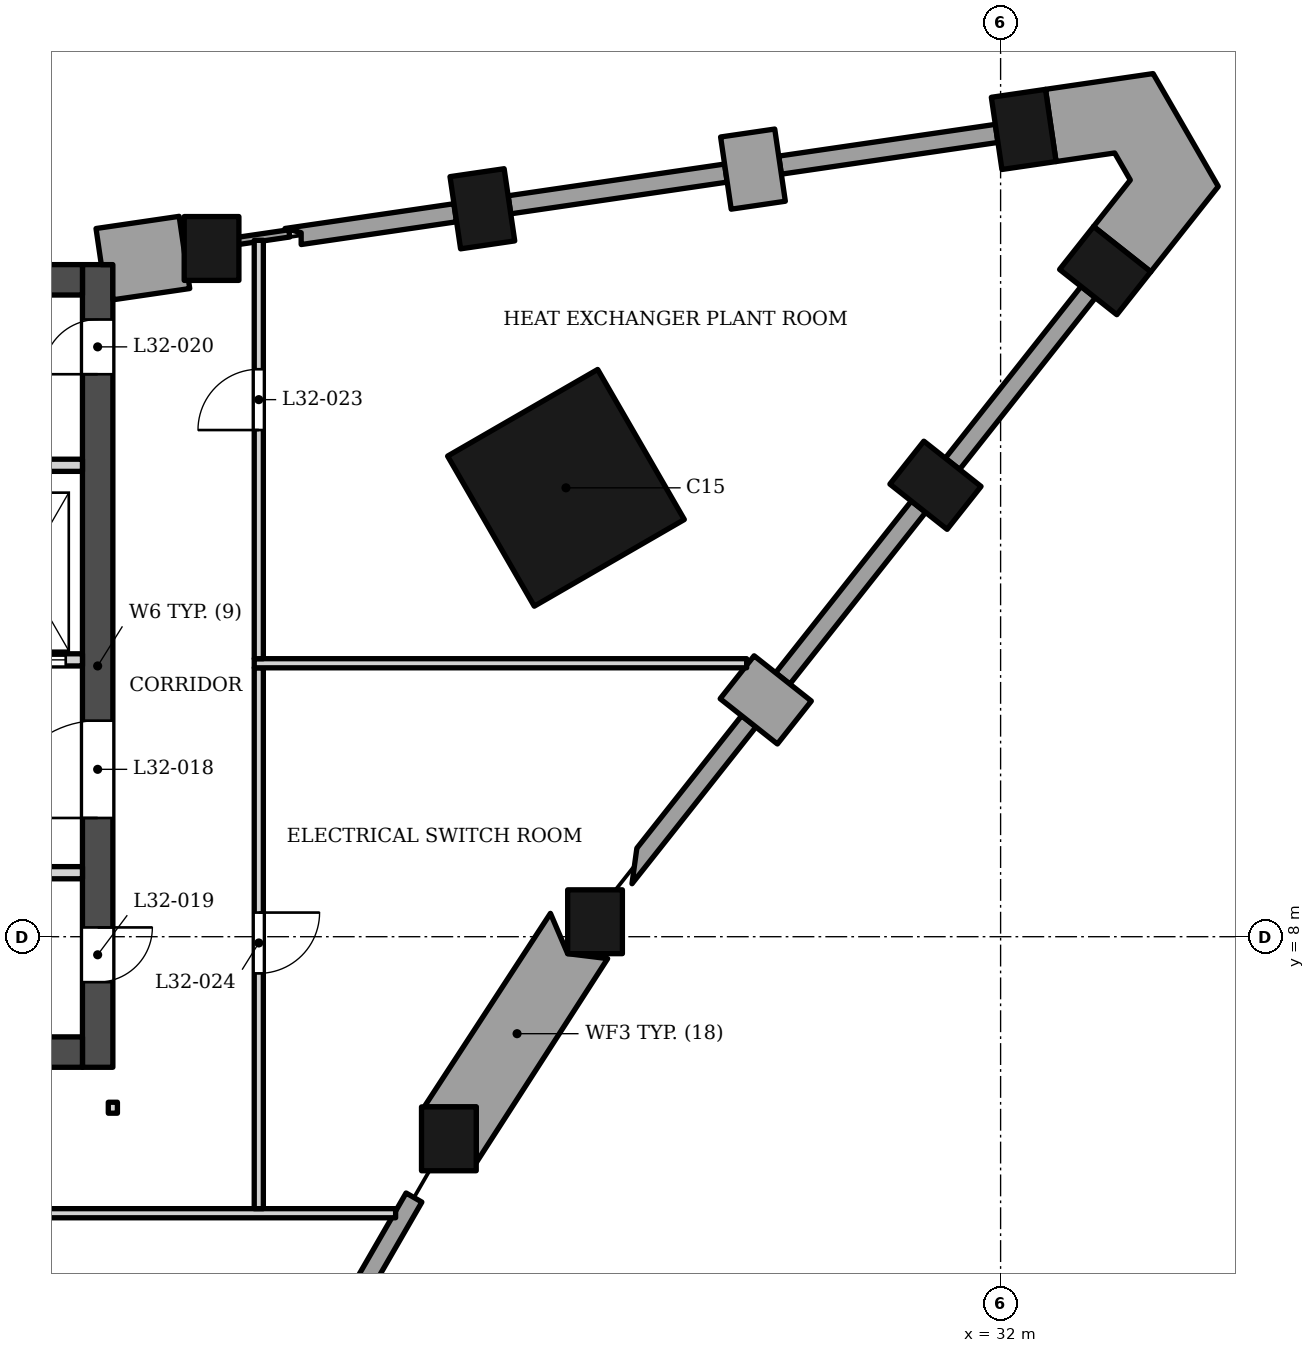
"""IFC4 building model, lengths in metres.
Left out: names, types, materials, properties, quantities, classifications, styles, units other than length and angle.
Written with IfcOpenShell. Run it as: python <this file> out.ifc"""

import sys

from ifc_helpers import new_model, si_unit, direction, frame, frame_2d, origin, origin_2d, place, context, subcontext, project, spatial, polyline, rectangle, outline, extrude, clip, halfspace, element, fill, save


model = new_model("IFC4")
c1 = context("Model", 3, precision=1e-05, world=origin(), true_north=direction((0.0, 1.0)))
c2 = subcontext(c1, "Body", "Model", "MODEL_VIEW")
j1 = project(units=[si_unit("LENGTHUNIT", "METRE"), si_unit("PLANEANGLEUNIT", "RADIAN")], contexts=[c1])
p1 = place(None, origin())
s1 = spatial("IfcSite", under=j1, at=p1, CompositionType="ELEMENT")
p2 = place(p1, origin())
s2 = spatial("IfcBuilding", under=s1, at=p2, CompositionType="ELEMENT")
p3 = place(p2, frame((0.0, 0.0, 139.6)))
s3 = spatial("IfcBuildingStorey", under=s2, at=p3, CompositionType="ELEMENT", Elevation=139.6)
p4 = place(p3, frame((-16.9, 18.802, 0.0), z_axis=(0.0, 0.0, 1.0), x_axis=(1.0, 0.0, 0.0)))
e1 = element("IfcWall", 1, at=p4, inside=s3, PredefinedType="SHEAR", context=c2, shape_type="SweptSolid", body=[
    extrude(rectangle(XDim=33.8, YDim=0.5, at=frame_2d((16.9, 0.0))), origin(), (0.0, 0.0, 1.0), 5.0),
])
p5 = place(p3, frame((12.6, 6.103, 0.0), z_axis=(0.0, 0.0, 1.0), x_axis=(1.0, 0.0, 0.0)))
e2 = element("IfcWall", 2, at=p5, inside=s3, PredefinedType="SHEAR", context=c2, shape_type="SweptSolid", body=[
    extrude(rectangle(XDim=4.3, YDim=0.5, at=frame_2d((2.15, 0.0))), origin(), (0.0, 0.0, 1.0), 5.0),
])
p6 = place(p3, frame((17.15, 5.853, 0.0), z_axis=(0.0, 0.0, 1.0), x_axis=(0.0, 1.0, 0.0)))
e3 = element("IfcWall", 3, at=p6, inside=s3, PredefinedType="SHEAR", context=c2, shape_type="SweptSolid", body=[
    extrude(rectangle(XDim=13.2, YDim=0.5, at=frame_2d((6.6, 0.0))), origin(), (0.0, 0.0, 1.0), 5.0),
])
p7 = place(p6, frame((4.1, 0.0, 0.0)))
e4 = element("IfcOpeningElement", 4, at=p7, cuts=e3, PredefinedType="OPENING", context=c2, shape_type="SweptSolid", body=[
    extrude(rectangle(XDim=1.6, YDim=2.1, at=frame_2d((0.8, 1.05))), frame((0.0, 0.26, 0.0), z_axis=(0.0, -1.0, 0.0), x_axis=(1.0, 0.0, 0.0)), (0.0, 0.0, 1.0), 0.52),
])
p8 = place(p6, frame((1.4, 0.0, 0.0)))
e5 = element("IfcOpeningElement", 5, at=p8, cuts=e3, PredefinedType="OPENING", context=c2, shape_type="SweptSolid", body=[
    extrude(rectangle(XDim=0.9, YDim=2.1, at=frame_2d((0.45, 1.05))), frame((0.0, 0.26, 0.0), z_axis=(0.0, -1.0, 0.0), x_axis=(1.0, 0.0, 0.0)), (0.0, 0.0, 1.0), 0.52),
])
p9 = place(p6, frame((11.397, 0.0, 0.0)))
e6 = element("IfcOpeningElement", 6, at=p9, cuts=e3, PredefinedType="OPENING", context=c2, shape_type="SweptSolid", body=[
    extrude(rectangle(XDim=0.9, YDim=2.1, at=frame_2d((0.45, 1.05))), frame((0.0, 0.26, 0.0), z_axis=(0.0, -1.0, 0.0), x_axis=(1.0, 0.0, 0.0)), (0.0, 0.0, 1.0), 0.52),
])
for number, where, z_axis, x_axis in (
    (7, (30.929, 15.424, 0.0), (0.0, 0.0, 1.0), (0.62, 0.784, 0.0)),
    (8, (33.72, 18.954, 0.0), (0.0, 0.0, 1.0), (0.62, 0.784, 0.0)),
    (9, (32.38, 21.276, 0.0), (0.0, 0.0, 1.0), (-0.989, -0.145, 0.0)),
    (10, (23.477, 19.971, 0.0), (0.0, 0.0, 1.0), (-0.989, -0.145, 0.0)),
):
    element("IfcColumn", number, at=place(p3, frame(where, z_axis=z_axis, x_axis=x_axis)), inside=s3, PredefinedType="COLUMN", context=c2, shape_type="SweptSolid", body=[
        extrude(rectangle(XDim=0.9, YDim=1.2, at=origin_2d()), origin(), (0.0, 0.0, 1.0), 5.0),
    ])
p10 = place(p3, frame((24.852, 15.382, 0.0), z_axis=(0.0, 0.0, 1.0), x_axis=(-0.866025403784, -0.5, 0.0)))
e11 = element("IfcColumn", 11, at=p10, inside=s3, PredefinedType="COLUMN", context=c2, shape_type="SweptSolid", body=[
    extrude(rectangle(XDim=2.85, YDim=2.85, at=origin_2d()), origin(), (0.0, 0.0, 1.0), 5.0),
])
p11 = place(p3, frame((22.926, 4.676, 0.0), z_axis=(-0.300174860852, -0.087380939098, 0.949873478098), x_axis=(0.279498644508, -0.960146086655, 0.0)))
e12 = element("IfcColumn", 12, at=p11, inside=s3, PredefinedType="COLUMN", context=c2, shape_type="Clipping", body=[
    clip(clip(extrude(rectangle(XDim=0.9, YDim=1.05, at=origin_2d()), origin(), (0.0, 0.0, 1.0), 5.264), halfspace(frame((0.0, 0.0, 0.177), z_axis=(0.0, 0.0, 1.0), x_axis=(1.0, 0.0, 0.0)), True)), halfspace(frame((0.0, 0.0, 5.087), z_axis=(0.0, 0.0, 1.0), x_axis=(1.0, 0.0, 0.0)), False)),
])
p12 = place(p3, frame((25.33, 8.246, 0.0), z_axis=(0.082150199486, 0.599389316364, 0.796230991706), x_axis=(-0.990738041901, 0.135787084552, 0.0)))
e13 = element("IfcColumn", 13, at=p12, inside=s3, PredefinedType="COLUMN", context=c2, shape_type="Clipping", body=[
    clip(clip(extrude(rectangle(XDim=0.9, YDim=1.05, at=origin_2d()), origin(), (0.0, 0.0, 1.0), 6.28), halfspace(frame((0.0, 0.0, 0.404), z_axis=(0.0, 0.0, 1.0), x_axis=(1.0, 0.0, 0.0)), True)), halfspace(frame((0.0, 0.0, 5.875), z_axis=(0.0, 0.0, 1.0), x_axis=(1.0, 0.0, 0.0)), False)),
])
p13 = place(p3, frame((19.023, 19.318, 0.0), z_axis=(0.200397317099, -0.051878781018, 0.978340179784), x_axis=(0.250617765495, 0.968086119939, 0.0)))
e14 = element("IfcColumn", 14, at=p13, inside=s3, PredefinedType="COLUMN", context=c2, shape_type="Clipping", body=[
    clip(clip(extrude(rectangle(XDim=0.9, YDim=1.05, at=origin_2d()), origin(), (0.0, 0.0, 1.0), 5.111), halfspace(frame((0.0, 0.0, 0.117), z_axis=(0.0, 0.0, 1.0), x_axis=(1.0, 0.0, 0.0)), True)), halfspace(frame((0.0, 0.0, 4.994), z_axis=(0.0, 0.0, 1.0), x_axis=(1.0, 0.0, 0.0)), False)),
])
p14 = place(p3, frame((20.552, 0.593, 0.0), z_axis=(0.0, 0.0, 1.0), x_axis=(0.500012057535, 0.866018442252, 0.0)))
e15 = element("IfcWall", 15, at=p14, inside=s3, PredefinedType="ELEMENTEDWALL", context=c2, shape_type="SweptSolid", body=[
    extrude(rectangle(XDim=3.6, YDim=0.3, at=frame_2d((1.8, 0.0))), origin(), (0.0, 0.0, 1.0), 3.5),
])
p15 = place(p3, frame((28.608, 11.522, 0.0), z_axis=(0.0, 0.0, 1.0), x_axis=(-0.784408686564, 0.620244316736, 0.0)))
e16 = element("IfcWall", 16, at=p15, inside=s3, PredefinedType="SOLIDWALL", context=c2, shape_type="SweptSolid", body=[
    extrude(rectangle(XDim=1.2, YDim=0.9, at=frame_2d((0.6, 0.0))), origin(), (0.0, 0.0, 1.0), 3.5),
])
p16 = place(p3, origin())
e17 = element("IfcWall", 17, at=p16, inside=s3, PredefinedType="ELEMENTEDWALL", context=c2, shape_type="SweptSolid", body=[
    extrude(outline(polyline([(27.741, 11.635), (26.018, 9.456), (25.938, 8.871), (27.976, 11.449), (27.741, 11.635)])), origin(), (0.0, 0.0, 1.0), 3.5),
])
p17 = place(p3, frame((28.417, 12.248, 0.0), z_axis=(0.0, 0.0, 1.0), x_axis=(0.620310302622, 0.784356505972, 0.0)))
e18 = element("IfcWall", 18, at=p17, inside=s3, PredefinedType="ELEMENTEDWALL", context=c2, shape_type="SweptSolid", body=[
    extrude(rectangle(XDim=3.6, YDim=0.3, at=frame_2d((1.8, 0.0))), origin(), (0.0, 0.0, 1.0), 3.5),
])
p18 = place(p3, frame((31.208, 15.777, 0.0), z_axis=(0.0, 0.0, 1.0), x_axis=(0.620301575857, 0.784363407477, 0.0)))
e19 = element("IfcWall", 19, at=p18, inside=s3, PredefinedType="ELEMENTEDWALL", context=c2, shape_type="SweptSolid", body=[
    extrude(rectangle(XDim=3.6, YDim=0.3, at=frame_2d((1.8, 0.0))), origin(), (0.0, 0.0, 1.0), 3.5),
])
p19 = place(p3, frame((27.84, 21.217, 0.0), z_axis=(0.0, 0.0, 1.0), x_axis=(0.145066385332, -0.989421924078, 0.0)))
e20 = element("IfcWall", 20, at=p19, inside=s3, PredefinedType="SOLIDWALL", context=c2, shape_type="SweptSolid", body=[
    extrude(rectangle(XDim=1.2, YDim=0.9, at=frame_2d((0.6, 0.0))), origin(), (0.0, 0.0, 1.0), 3.5),
])
p20 = place(p3, frame((31.935, 21.211, 0.0), z_axis=(0.0, 0.0, 1.0), x_axis=(-0.98942335115, -0.145056651687, 0.0)))
e21 = element("IfcWall", 21, at=p20, inside=s3, PredefinedType="ELEMENTEDWALL", context=c2, shape_type="SweptSolid", body=[
    extrude(rectangle(XDim=3.6, YDim=0.3, at=frame_2d((1.8, 0.0))), origin(), (0.0, 0.0, 1.0), 3.5),
])
p21 = place(p3, origin())
e22 = element("IfcWall", 22, at=p21, inside=s3, PredefinedType="ELEMENTEDWALL", context=c2, shape_type="SweptSolid", body=[
    extrude(outline(polyline([(27.46, 20.707), (23.9, 20.185), (23.944, 19.888), (27.504, 20.41), (27.46, 20.707)])), origin(), (0.0, 0.0, 1.0), 3.5),
])
p22 = place(p3, origin())
e23 = element("IfcWall", 23, at=p22, inside=s3, PredefinedType="ELEMENTEDWALL", context=c2, shape_type="SweptSolid", body=[
    extrude(outline(polyline([(23.008, 20.054), (20.231, 19.647), (20.497, 19.578), (20.497, 19.383), (23.052, 19.757), (23.008, 20.054)])), origin(), (0.0, 0.0, 1.0), 3.5),
])
p23 = place(p3, origin())
e24 = element("IfcWall", 24, at=p23, inside=s3, PredefinedType="SOLIDWALL", context=c2, shape_type="SweptSolid", body=[
    extrude(outline(polyline([(24.597, 8.384), (22.52, 5.201), (23.376, 5.201), (23.376, 4.283), (25.538, 7.64), (24.88, 7.721), (24.597, 8.384)])), origin(), (0.0, 0.0, 1.0), 3.5),
])
p24 = place(p3, origin())
e25 = element("IfcWall", 25, at=p24, inside=s3, PredefinedType="SOLIDWALL", context=c2, shape_type="SweptSolid", body=[
    extrude(outline(polyline([(33.529, 19.679), (34.47, 18.935), (35.58, 20.338), (34.508, 22.194), (32.738, 21.935), (32.912, 20.748), (33.876, 20.889), (34.133, 20.443), (33.529, 19.679)])), origin(), (0.0, 0.0, 1.0), 3.5),
])
p25 = place(p3, origin())
e26 = element("IfcWall", 26, at=p25, inside=s3, PredefinedType="SOLIDWALL", context=c2, shape_type="SweptSolid", body=[
    extrude(outline(polyline([(18.664, 18.659), (18.49, 19.847), (17.123, 19.646), (17.21, 19.052), (17.4, 19.052), (17.4, 18.474), (18.664, 18.659)])), origin(), (0.0, 0.0, 1.0), 3.5),
])
p26 = place(p3, frame((19.421, 19.437, 0.0), z_axis=(0.0, 0.0, 1.0), x_axis=(0.989415964501, 0.145107026676, 0.0)))
e27 = element("IfcWall", 27, at=p26, inside=s3, PredefinedType="SOLIDWALL", context=c2, shape_type="SweptSolid", body=[
    extrude(rectangle(XDim=0.89, YDim=0.12, at=frame_2d((0.445, 0.0))), origin(), (0.0, 0.0, 1.0), 3.5),
])
p27 = place(p3, frame((12.6, 9.052, 0.0), z_axis=(0.0, 0.0, 1.0), x_axis=(1.0, 0.0, 0.0)))
e28 = element("IfcWall", 28, at=p27, inside=s3, PredefinedType="PARTITIONING", context=c2, shape_type="SweptSolid", body=[
    extrude(rectangle(XDim=4.3, YDim=0.2, at=frame_2d((2.15, 0.0))), origin(), (0.0, 0.0, 1.0), 4.83),
])
p28 = place(p3, frame((12.6, 12.552, 0.0), z_axis=(0.0, 0.0, 1.0), x_axis=(1.0, 0.0, 0.0)))
e29 = element("IfcWall", 29, at=p28, inside=s3, PredefinedType="SOLIDWALL", context=c2, shape_type="SweptSolid", body=[
    extrude(rectangle(XDim=4.3, YDim=0.2, at=frame_2d((2.15, 0.0))), origin(), (0.0, 0.0, 1.0), 4.83),
])
p29 = place(p28, frame((0.475, 0.0, 0.0)))
e30 = element("IfcOpeningElement", 30, at=p29, cuts=e29, PredefinedType="OPENING", context=c2, shape_type="SweptSolid", body=[
    extrude(rectangle(XDim=1.2, YDim=2.1, at=frame_2d((0.6, 1.05))), frame((0.0, 0.11, 0.0), z_axis=(0.0, -1.0, 0.0), x_axis=(1.0, 0.0, 0.0)), (0.0, 0.0, 1.0), 0.22),
])
p30 = place(p28, frame((2.625, 0.0, 0.0)))
e31 = element("IfcOpeningElement", 31, at=p30, cuts=e29, PredefinedType="OPENING", context=c2, shape_type="SweptSolid", body=[
    extrude(rectangle(XDim=1.4, YDim=2.1, at=frame_2d((0.7, 1.05))), frame((0.0, 0.11, 0.0), z_axis=(0.0, -1.0, 0.0), x_axis=(1.0, 0.0, 0.0)), (0.0, 0.0, 1.0), 0.22),
])
p31 = place(p3, frame((12.6, 15.753, 0.0), z_axis=(0.0, 0.0, 1.0), x_axis=(1.0, 0.0, 0.0)))
e32 = element("IfcWall", 32, at=p31, inside=s3, PredefinedType="SOLIDWALL", context=c2, shape_type="SweptSolid", body=[
    extrude(rectangle(XDim=4.3, YDim=0.2, at=frame_2d((2.15, 0.0))), origin(), (0.0, 0.0, 1.0), 4.83),
])
p32 = place(p3, frame((4.495, 3.453, 0.0), z_axis=(0.0, 0.0, 1.0), x_axis=(1.0, 0.0, 0.0)))
e33 = element("IfcWall", 33, at=p32, inside=s3, PredefinedType="PARTITIONING", context=c2, shape_type="SweptSolid", body=[
    extrude(rectangle(XDim=17.555, YDim=0.15, at=frame_2d((8.778, 0.0))), origin(), (0.0, 0.0, 1.0), 3.752),
])
p33 = place(p3, frame((19.8, 3.528, 0.0), z_axis=(0.0, 0.0, 1.0), x_axis=(0.0, 1.0, 0.0)))
e34 = element("IfcWall", 34, at=p33, inside=s3, PredefinedType="PARTITIONING", context=c2, shape_type="SweptSolid", body=[
    extrude(rectangle(XDim=8.895, YDim=0.15, at=frame_2d((4.447, 0.0))), origin(), (0.0, 0.0, 1.0), 4.05),
])
p34 = place(p33, frame((3.869, 0.0, 0.0)))
e35 = element("IfcOpeningElement", 35, at=p34, cuts=e34, PredefinedType="OPENING", context=c2, shape_type="SweptSolid", body=[
    extrude(rectangle(XDim=1.0, YDim=2.1, at=frame_2d((0.5, 1.05))), frame((0.0, 0.085, 0.0), z_axis=(0.0, -1.0, 0.0), x_axis=(1.0, 0.0, 0.0)), (0.0, 0.0, 1.0), 0.17),
])
p35 = place(p3, frame((17.4, 5.098, 0.0), z_axis=(0.0, 0.0, 1.0), x_axis=(0.0, 1.0, 0.0)))
e36 = element("IfcWall", 36, at=p35, inside=s3, PredefinedType="PARTITIONING", context=c2, shape_type="SweptSolid", body=[
    extrude(rectangle(XDim=0.18, YDim=0.15, at=frame_2d((0.09, 0.0))), origin(), (0.0, 0.0, 1.0), 4.05),
])
p36 = place(p3, frame((19.725, 12.497, 0.0), z_axis=(0.0, 0.0, 1.0), x_axis=(1.0, 0.0, 0.0)))
e37 = element("IfcWall", 37, at=p36, inside=s3, PredefinedType="PARTITIONING", context=c2, shape_type="SweptSolid", body=[
    extrude(rectangle(XDim=8.098, YDim=0.15, at=frame_2d((4.049, 0.0))), origin(), (0.0, 0.0, 1.0), 3.752),
])
p37 = place(p3, frame((19.8, 12.572, 0.0), z_axis=(0.0, 0.0, 1.0), x_axis=(0.0, 1.0, 0.0)))
e38 = element("IfcWall", 38, at=p37, inside=s3, PredefinedType="PARTITIONING", context=c2, shape_type="SweptSolid", body=[
    extrude(rectangle(XDim=6.88, YDim=0.15, at=frame_2d((3.44, 0.0))), origin(), (0.0, 0.0, 1.0), 3.752),
])
p38 = place(p37, frame((3.76, 0.0, 0.0)))
e39 = element("IfcOpeningElement", 39, at=p38, cuts=e38, PredefinedType="OPENING", context=c2, shape_type="SweptSolid", body=[
    extrude(rectangle(XDim=1.0, YDim=2.1, at=frame_2d((0.5, 1.05))), frame((0.0, 0.085, 0.0), z_axis=(0.0, -1.0, 0.0), x_axis=(1.0, 0.0, 0.0)), (0.0, 0.0, 1.0), 0.17),
])
p39 = place(p30, origin())
e40 = element("IfcDoor", 40, at=p39, inside=s3, OperationType="DOUBLE_DOOR_SLIDING", PredefinedType="DOOR", context=c2, shape_type="SweptSolid", body=[
    extrude(rectangle(XDim=1.4, YDim=2.1, at=frame_2d((0.7, 1.05))), frame((0.0, 0.025, 0.0), z_axis=(0.0, -1.0, 0.0), x_axis=(1.0, 0.0, 0.0)), (0.0, 0.0, 1.0), 0.05),
])
fill(e31, e40)
p40 = place(p7, origin())
e41 = element("IfcDoor", 41, at=p40, inside=s3, OperationType="DOUBLE_DOOR_SINGLE_SWING", PredefinedType="DOOR", context=c2, shape_type="SweptSolid", body=[
    extrude(rectangle(XDim=1.6, YDim=2.1, at=frame_2d((0.8, 1.05))), frame((0.0, 0.025, 0.0), z_axis=(0.0, -1.0, 0.0), x_axis=(1.0, 0.0, 0.0)), (0.0, 0.0, 1.0), 0.05),
])
fill(e4, e41)
p41 = place(p8, origin())
e42 = element("IfcDoor", 42, at=p41, inside=s3, OperationType="SINGLE_SWING_RIGHT", PredefinedType="DOOR", context=c2, shape_type="SweptSolid", body=[
    extrude(rectangle(XDim=0.9, YDim=2.1, at=frame_2d((0.45, 1.05))), frame((0.0, 0.025, 0.0), z_axis=(0.0, -1.0, 0.0), x_axis=(1.0, 0.0, 0.0)), (0.0, 0.0, 1.0), 0.05),
])
fill(e5, e42)
p42 = place(p9, origin())
e43 = element("IfcDoor", 43, at=p42, inside=s3, OperationType="SINGLE_SWING_LEFT", PredefinedType="DOOR", context=c2, shape_type="SweptSolid", body=[
    extrude(rectangle(XDim=0.9, YDim=2.1, at=frame_2d((0.45, 1.05))), frame((0.0, 0.025, 0.0), z_axis=(0.0, -1.0, 0.0), x_axis=(1.0, 0.0, 0.0)), (0.0, 0.0, 1.0), 0.05),
])
fill(e6, e43)
p43 = place(p38, origin())
e44 = element("IfcDoor", 44, at=p43, inside=s3, OperationType="SINGLE_SWING_LEFT", PredefinedType="DOOR", context=c2, shape_type="SweptSolid", body=[
    extrude(rectangle(XDim=1.0, YDim=2.1, at=frame_2d((0.5, 1.05))), frame((0.0, 0.025, 0.0), z_axis=(0.0, -1.0, 0.0), x_axis=(1.0, 0.0, 0.0)), (0.0, 0.0, 1.0), 0.05),
])
fill(e39, e44)
p44 = place(p34, origin())
e45 = element("IfcDoor", 45, at=p44, inside=s3, OperationType="SINGLE_SWING_RIGHT", PredefinedType="DOOR", context=c2, shape_type="SweptSolid", body=[
    extrude(rectangle(XDim=1.0, YDim=2.1, at=frame_2d((0.5, 1.05))), frame((0.0, 0.025, 0.0), z_axis=(0.0, -1.0, 0.0), x_axis=(1.0, 0.0, 0.0)), (0.0, 0.0, 1.0), 0.05),
])
fill(e35, e45)
save(model, sys.argv[1])
